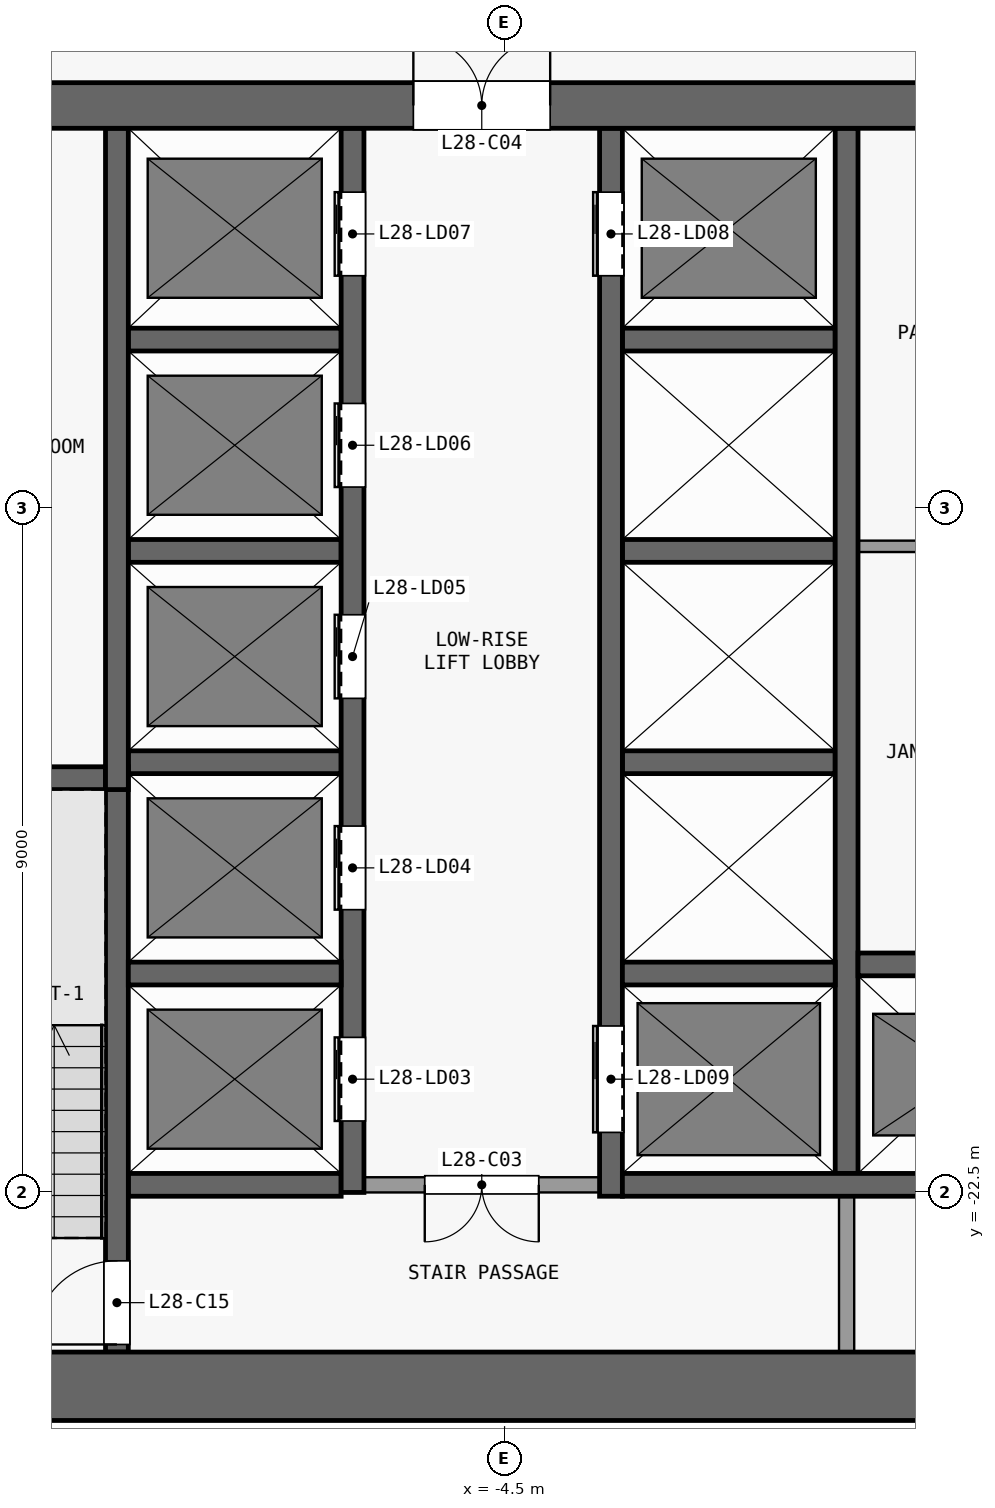
"""IFC4 building model, lengths in metres.
Left out: names, types, materials, properties, quantities, classifications, styles, units other than length and angle.
Written with IfcOpenShell. Run it as: python <this file> out.ifc"""

import sys

from ifc_helpers import new_model, si_unit, direction, frame, frame_2d, origin, place, context, subcontext, project, spatial, rectangle, extrude, element, fill, save


model = new_model("IFC4")
c1 = context("Model", 3, precision=1e-05, world=origin(), true_north=direction((0.0, 1.0)))
c2 = subcontext(c1, "Body", "Model", "MODEL_VIEW")
j1 = project(units=[si_unit("LENGTHUNIT", "METRE"), si_unit("PLANEANGLEUNIT", "RADIAN")], contexts=[c1])
p1 = place(None, origin())
s1 = spatial("IfcSite", under=j1, at=p1, CompositionType="ELEMENT")
p2 = place(p1, origin())
s2 = spatial("IfcBuilding", under=s1, at=p2, CompositionType="ELEMENT")
p3 = place(p2, frame((0.0, 0.0, 113.5)))
s3 = spatial("IfcBuildingStorey", under=s2, at=p3, CompositionType="ELEMENT", Elevation=113.5)
p4 = place(p3, frame((-13.4, -25.05, 0.0), z_axis=(0.0, 0.0, 1.0), x_axis=(1.0, 0.0, 0.0)))
e1 = element("IfcWall", 1, at=p4, inside=s3, PredefinedType="SHEAR", context=c2, shape_type="SweptSolid", body=[
    extrude(rectangle(XDim=26.8, YDim=0.9, at=frame_2d((13.4, 0.0))), origin(), (0.0, 0.0, 1.0), 3.3),
])
p5 = place(p3, frame((-13.4, -8.2, 0.0), z_axis=(0.0, 0.0, 1.0), x_axis=(1.0, 0.0, 0.0)))
e2 = element("IfcWall", 2, at=p5, inside=s3, PredefinedType="SHEAR", context=c2, shape_type="SweptSolid", body=[
    extrude(rectangle(XDim=26.8, YDim=0.6, at=frame_2d((13.4, 0.0))), origin(), (0.0, 0.0, 1.0), 3.3),
])
p6 = place(p5, frame((7.7, 0.0, 0.0)))
e3 = element("IfcOpeningElement", 3, at=p6, cuts=e2, PredefinedType="OPENING", context=c2, shape_type="SweptSolid", body=[
    extrude(rectangle(XDim=1.8, YDim=2.1, at=frame_2d((0.9, 1.05))), frame((0.0, 0.31, 0.0), z_axis=(0.0, -1.0, 0.0), x_axis=(1.0, 0.0, 0.0)), (0.0, 0.0, 1.0), 0.62),
])
p7 = place(p5, frame((17.3, 0.0, 0.0)))
e4 = element("IfcOpeningElement", 4, at=p7, cuts=e2, PredefinedType="OPENING", context=c2, shape_type="SweptSolid", body=[
    extrude(rectangle(XDim=1.8, YDim=2.1, at=frame_2d((0.9, 1.05))), frame((0.0, 0.31, 0.0), z_axis=(0.0, -1.0, 0.0), x_axis=(1.0, 0.0, 0.0)), (0.0, 0.0, 1.0), 0.62),
])
p8 = place(p5, frame((1.625, 0.0, 0.0)))
e5 = element("IfcOpeningElement", 5, at=p8, cuts=e2, PredefinedType="OPENING", context=c2, shape_type="SweptSolid", body=[
    extrude(rectangle(XDim=1.2, YDim=2.1, at=frame_2d((0.6, 1.05))), frame((0.0, 0.31, 0.0), z_axis=(0.0, -1.0, 0.0), x_axis=(1.0, 0.0, 0.0)), (0.0, 0.0, 1.0), 0.62),
])
p9 = place(p5, frame((23.275, 0.0, 0.0)))
e6 = element("IfcOpeningElement", 6, at=p9, cuts=e2, PredefinedType="OPENING", context=c2, shape_type="SweptSolid", body=[
    extrude(rectangle(XDim=0.9, YDim=2.1, at=frame_2d((0.45, 1.05))), frame((0.0, 0.31, 0.0), z_axis=(0.0, -1.0, 0.0), x_axis=(1.0, 0.0, 0.0)), (0.0, 0.0, 1.0), 0.62),
])
p10 = place(p3, frame((-9.45, -22.4, 0.0), z_axis=(0.0, 0.0, 1.0), x_axis=(1.0, 0.0, 0.0)))
e7 = element("IfcWall", 7, at=p10, inside=s3, PredefinedType="SHEAR", context=c2, shape_type="SweptSolid", body=[
    extrude(rectangle(XDim=2.8, YDim=0.3, at=frame_2d((1.4, 0.0))), origin(), (0.0, 0.0, 1.0), 3.3),
])
p11 = place(p3, frame((-3.25, -22.4, 0.0), z_axis=(0.0, 0.0, 1.0), x_axis=(-1.0, 0.0, 0.0)))
e8 = element("IfcWall", 8, at=p11, inside=s3, PredefinedType="PARTITIONING", context=c2, shape_type="SweptSolid", body=[
    extrude(rectangle(XDim=3.1, YDim=0.2, at=frame_2d((1.55, 0.0))), origin(), (0.0, 0.0, 1.0), 3.3),
])
p12 = place(p11, frame((0.8, 0.0, 0.0)))
e9 = element("IfcOpeningElement", 9, at=p12, cuts=e8, PredefinedType="OPENING", context=c2, shape_type="SweptSolid", body=[
    extrude(rectangle(XDim=1.5, YDim=2.1, at=frame_2d((0.75, 1.05))), frame((0.0, 0.11, 0.0), z_axis=(0.0, -1.0, 0.0), x_axis=(1.0, 0.0, 0.0)), (0.0, 0.0, 1.0), 0.22),
])
p13 = place(p3, frame((-2.95, -22.4, 0.0), z_axis=(0.0, 0.0, 1.0), x_axis=(1.0, 0.0, 0.0)))
e10 = element("IfcWall", 10, at=p13, inside=s3, PredefinedType="SHEAR", context=c2, shape_type="SweptSolid", body=[
    extrude(rectangle(XDim=6.2, YDim=0.3, at=frame_2d((3.1, 0.0))), origin(), (0.0, 0.0, 1.0), 3.3),
])
for number, where, z_axis, x_axis in (
    (11, (-9.45, -19.62, 0.0), (0.0, 0.0, 1.0), (1.0, 0.0, 0.0)),
    (12, (-2.95, -19.62, 0.0), (0.0, 0.0, 1.0), (1.0, 0.0, 0.0)),
):
    element("IfcWall", number, at=place(p3, frame(where, z_axis=z_axis, x_axis=x_axis)), inside=s3, PredefinedType="SHEAR", context=c2, shape_type="SweptSolid", body=[
        extrude(rectangle(XDim=2.8, YDim=0.3, at=frame_2d((1.4, 0.0))), origin(), (0.0, 0.0, 1.0), 3.3),
    ])
p14 = place(p3, frame((0.15, -19.5, 0.0), z_axis=(0.0, 0.0, 1.0), x_axis=(1.0, 0.0, 0.0)))
e13 = element("IfcWall", 13, at=p14, inside=s3, PredefinedType="SHEAR", context=c2, shape_type="SweptSolid", body=[
    extrude(rectangle(XDim=3.025, YDim=0.3, at=frame_2d((1.513, 0.0))), origin(), (0.0, 0.0, 1.0), 3.3),
])
p15 = place(p3, frame((-12.6, -17.05, 0.0), z_axis=(0.0, 0.0, 1.0), x_axis=(1.0, 0.0, 0.0)))
e14 = element("IfcWall", 14, at=p15, inside=s3, PredefinedType="SHEAR", context=c2, shape_type="SweptSolid", body=[
    extrude(rectangle(XDim=2.85, YDim=0.3, at=frame_2d((1.425, 0.0))), origin(), (0.0, 0.0, 1.0), 3.3),
])
for number, where, z_axis, x_axis in (
    (15, (-9.45, -16.84, 0.0), (0.0, 0.0, 1.0), (1.0, 0.0, 0.0)),
    (16, (-2.95, -16.84, 0.0), (0.0, 0.0, 1.0), (1.0, 0.0, 0.0)),
    (17, (-9.45, -14.06, 0.0), (0.0, 0.0, 1.0), (1.0, 0.0, 0.0)),
    (18, (-2.95, -14.06, 0.0), (0.0, 0.0, 1.0), (1.0, 0.0, 0.0)),
):
    element("IfcWall", number, at=place(p3, frame(where, z_axis=z_axis, x_axis=x_axis)), inside=s3, PredefinedType="SHEAR", context=c2, shape_type="SweptSolid", body=[
        extrude(rectangle(XDim=2.8, YDim=0.3, at=frame_2d((1.4, 0.0))), origin(), (0.0, 0.0, 1.0), 3.3),
    ])
p16 = place(p3, frame((0.15, -14.0, 0.0), z_axis=(0.0, 0.0, 1.0), x_axis=(1.0, 0.0, 0.0)))
e19 = element("IfcWall", 19, at=p16, inside=s3, PredefinedType="PARTITIONING", context=c2, shape_type="SweptSolid", body=[
    extrude(rectangle(XDim=2.875, YDim=0.15, at=frame_2d((1.438, 0.0))), origin(), (0.0, 0.0, 1.0), 3.3),
])
for number, where, z_axis, x_axis in (
    (20, (-9.45, -11.28, 0.0), (0.0, 0.0, 1.0), (1.0, 0.0, 0.0)),
    (21, (-2.95, -11.28, 0.0), (0.0, 0.0, 1.0), (1.0, 0.0, 0.0)),
):
    element("IfcWall", number, at=place(p3, frame(where, z_axis=z_axis, x_axis=x_axis)), inside=s3, PredefinedType="SHEAR", context=c2, shape_type="SweptSolid", body=[
        extrude(rectangle(XDim=2.8, YDim=0.3, at=frame_2d((1.4, 0.0))), origin(), (0.0, 0.0, 1.0), 3.3),
    ])
p17 = place(p3, frame((-9.6, -24.6, 0.0), z_axis=(0.0, 0.0, 1.0), x_axis=(0.0, 1.0, 0.0)))
e22 = element("IfcWall", 22, at=p17, inside=s3, PredefinedType="SHEAR", context=c2, shape_type="SweptSolid", body=[
    extrude(rectangle(XDim=7.7, YDim=0.3, at=frame_2d((3.85, 0.0))), origin(), (0.0, 0.0, 1.0), 3.3),
])
p18 = place(p17, frame((0.1, 0.0, 0.0)))
e23 = element("IfcOpeningElement", 23, at=p18, cuts=e22, PredefinedType="OPENING", context=c2, shape_type="SweptSolid", body=[
    extrude(rectangle(XDim=1.1, YDim=2.1, at=frame_2d((0.55, 1.05))), frame((0.0, 0.16, 0.0), z_axis=(0.0, -1.0, 0.0), x_axis=(1.0, 0.0, 0.0)), (0.0, 0.0, 1.0), 0.32),
])
p19 = place(p3, frame((-9.6, -17.2, 0.0), z_axis=(0.0, 0.0, 1.0), x_axis=(0.0, 1.0, 0.0)))
e24 = element("IfcWall", 24, at=p19, inside=s3, PredefinedType="SHEAR", context=c2, shape_type="SweptSolid", body=[
    extrude(rectangle(XDim=8.7, YDim=0.3, at=frame_2d((4.35, 0.0))), origin(), (0.0, 0.0, 1.0), 3.3),
])
p20 = place(p3, frame((-6.5, -22.5, 0.0), z_axis=(0.0, 0.0, 1.0), x_axis=(0.0, 1.0, 0.0)))
e25 = element("IfcWall", 25, at=p20, inside=s3, PredefinedType="SHEAR", context=c2, shape_type="SweptSolid", body=[
    extrude(rectangle(XDim=14.0, YDim=0.3, at=frame_2d((7.0, 0.0))), origin(), (0.0, 0.0, 1.0), 3.3),
])
p21 = place(p20, frame((0.94, 0.0, 0.0)))
e26 = element("IfcOpeningElement", 26, at=p21, cuts=e25, PredefinedType="OPENING", context=c2, shape_type="SweptSolid", body=[
    extrude(rectangle(XDim=1.1, YDim=2.1, at=frame_2d((0.55, 1.05))), frame((0.0, 0.16, 0.0), z_axis=(0.0, -1.0, 0.0), x_axis=(1.0, 0.0, 0.0)), (0.0, 0.0, 1.0), 0.32),
])
p22 = place(p20, frame((3.72, 0.0, 0.0)))
e27 = element("IfcOpeningElement", 27, at=p22, cuts=e25, PredefinedType="OPENING", context=c2, shape_type="SweptSolid", body=[
    extrude(rectangle(XDim=1.1, YDim=2.1, at=frame_2d((0.55, 1.05))), frame((0.0, 0.16, 0.0), z_axis=(0.0, -1.0, 0.0), x_axis=(1.0, 0.0, 0.0)), (0.0, 0.0, 1.0), 0.32),
])
p23 = place(p20, frame((6.5, 0.0, 0.0)))
e28 = element("IfcOpeningElement", 28, at=p23, cuts=e25, PredefinedType="OPENING", context=c2, shape_type="SweptSolid", body=[
    extrude(rectangle(XDim=1.1, YDim=2.1, at=frame_2d((0.55, 1.05))), frame((0.0, 0.16, 0.0), z_axis=(0.0, -1.0, 0.0), x_axis=(1.0, 0.0, 0.0)), (0.0, 0.0, 1.0), 0.32),
])
p24 = place(p20, frame((9.28, 0.0, 0.0)))
e29 = element("IfcOpeningElement", 29, at=p24, cuts=e25, PredefinedType="OPENING", context=c2, shape_type="SweptSolid", body=[
    extrude(rectangle(XDim=1.1, YDim=2.1, at=frame_2d((0.55, 1.05))), frame((0.0, 0.16, 0.0), z_axis=(0.0, -1.0, 0.0), x_axis=(1.0, 0.0, 0.0)), (0.0, 0.0, 1.0), 0.32),
])
p25 = place(p20, frame((12.06, 0.0, 0.0)))
e30 = element("IfcOpeningElement", 30, at=p25, cuts=e25, PredefinedType="OPENING", context=c2, shape_type="SweptSolid", body=[
    extrude(rectangle(XDim=1.1, YDim=2.1, at=frame_2d((0.55, 1.05))), frame((0.0, 0.16, 0.0), z_axis=(0.0, -1.0, 0.0), x_axis=(1.0, 0.0, 0.0)), (0.0, 0.0, 1.0), 0.32),
])
p26 = place(p3, frame((-3.1, -22.55, 0.0), z_axis=(0.0, 0.0, 1.0), x_axis=(0.0, 1.0, 0.0)))
e31 = element("IfcWall", 31, at=p26, inside=s3, PredefinedType="SHEAR", context=c2, shape_type="SweptSolid", body=[
    extrude(rectangle(XDim=14.05, YDim=0.3, at=frame_2d((7.025, 0.0))), origin(), (0.0, 0.0, 1.0), 3.3),
])
p27 = place(p26, frame((12.11, 0.0, 0.0)))
e32 = element("IfcOpeningElement", 32, at=p27, cuts=e31, PredefinedType="OPENING", context=c2, shape_type="SweptSolid", body=[
    extrude(rectangle(XDim=1.1, YDim=2.1, at=frame_2d((0.55, 1.05))), frame((0.0, 0.16, 0.0), z_axis=(0.0, -1.0, 0.0), x_axis=(1.0, 0.0, 0.0)), (0.0, 0.0, 1.0), 0.32),
])
p28 = place(p26, frame((0.84, 0.0, 0.0)))
e33 = element("IfcOpeningElement", 33, at=p28, cuts=e31, PredefinedType="OPENING", context=c2, shape_type="SweptSolid", body=[
    extrude(rectangle(XDim=1.4, YDim=2.1, at=frame_2d((0.7, 1.05))), frame((0.0, 0.16, 0.0), z_axis=(0.0, -1.0, 0.0), x_axis=(1.0, 0.0, 0.0)), (0.0, 0.0, 1.0), 0.32),
])
p29 = place(p3, frame((0.0, -24.6, 0.0), z_axis=(0.0, 0.0, 1.0), x_axis=(0.0, 1.0, 0.0)))
e34 = element("IfcWall", 34, at=p29, inside=s3, PredefinedType="PARTITIONING", context=c2, shape_type="SweptSolid", body=[
    extrude(rectangle(XDim=2.05, YDim=0.2, at=frame_2d((1.025, 0.0))), origin(), (0.0, 0.0, 1.0), 3.3),
])
p30 = place(p3, frame((0.0, -22.25, 0.0), z_axis=(0.0, 0.0, 1.0), x_axis=(0.0, 1.0, 0.0)))
e35 = element("IfcWall", 35, at=p30, inside=s3, PredefinedType="SHEAR", context=c2, shape_type="SweptSolid", body=[
    extrude(rectangle(XDim=13.75, YDim=0.3, at=frame_2d((6.875, 0.0))), origin(), (0.0, 0.0, 1.0), 3.3),
])
p31 = place(p21, origin())
e36 = element("IfcDoor", 36, at=p31, inside=s3, OperationType="DOUBLE_DOOR_SLIDING", PredefinedType="DOOR", context=c2, shape_type="SweptSolid", body=[
    extrude(rectangle(XDim=1.1, YDim=2.1, at=frame_2d((0.55, 1.05))), frame((0.0, 0.025, 0.0), z_axis=(0.0, -1.0, 0.0), x_axis=(1.0, 0.0, 0.0)), (0.0, 0.0, 1.0), 0.05),
])
fill(e26, e36)
p32 = place(p22, origin())
e37 = element("IfcDoor", 37, at=p32, inside=s3, OperationType="DOUBLE_DOOR_SLIDING", PredefinedType="DOOR", context=c2, shape_type="SweptSolid", body=[
    extrude(rectangle(XDim=1.1, YDim=2.1, at=frame_2d((0.55, 1.05))), frame((0.0, 0.025, 0.0), z_axis=(0.0, -1.0, 0.0), x_axis=(1.0, 0.0, 0.0)), (0.0, 0.0, 1.0), 0.05),
])
fill(e27, e37)
p33 = place(p23, origin())
e38 = element("IfcDoor", 38, at=p33, inside=s3, OperationType="DOUBLE_DOOR_SLIDING", PredefinedType="DOOR", context=c2, shape_type="SweptSolid", body=[
    extrude(rectangle(XDim=1.1, YDim=2.1, at=frame_2d((0.55, 1.05))), frame((0.0, 0.025, 0.0), z_axis=(0.0, -1.0, 0.0), x_axis=(1.0, 0.0, 0.0)), (0.0, 0.0, 1.0), 0.05),
])
fill(e28, e38)
p34 = place(p24, origin())
e39 = element("IfcDoor", 39, at=p34, inside=s3, OperationType="DOUBLE_DOOR_SLIDING", PredefinedType="DOOR", context=c2, shape_type="SweptSolid", body=[
    extrude(rectangle(XDim=1.1, YDim=2.1, at=frame_2d((0.55, 1.05))), frame((0.0, 0.025, 0.0), z_axis=(0.0, -1.0, 0.0), x_axis=(1.0, 0.0, 0.0)), (0.0, 0.0, 1.0), 0.05),
])
fill(e29, e39)
p35 = place(p25, origin())
e40 = element("IfcDoor", 40, at=p35, inside=s3, OperationType="DOUBLE_DOOR_SLIDING", PredefinedType="DOOR", context=c2, shape_type="SweptSolid", body=[
    extrude(rectangle(XDim=1.1, YDim=2.1, at=frame_2d((0.55, 1.05))), frame((0.0, 0.025, 0.0), z_axis=(0.0, -1.0, 0.0), x_axis=(1.0, 0.0, 0.0)), (0.0, 0.0, 1.0), 0.05),
])
fill(e30, e40)
p36 = place(p27, origin())
e41 = element("IfcDoor", 41, at=p36, inside=s3, OperationType="DOUBLE_DOOR_SLIDING", PredefinedType="DOOR", context=c2, shape_type="SweptSolid", body=[
    extrude(rectangle(XDim=1.1, YDim=2.1, at=frame_2d((0.55, 1.05))), frame((0.0, 0.025, 0.0), z_axis=(0.0, -1.0, 0.0), x_axis=(1.0, 0.0, 0.0)), (0.0, 0.0, 1.0), 0.05),
])
fill(e32, e41)
p37 = place(p28, origin())
e42 = element("IfcDoor", 42, at=p37, inside=s3, OperationType="DOUBLE_DOOR_SLIDING", PredefinedType="DOOR", context=c2, shape_type="SweptSolid", body=[
    extrude(rectangle(XDim=1.4, YDim=2.1, at=frame_2d((0.7, 1.05))), frame((0.0, 0.025, 0.0), z_axis=(0.0, -1.0, 0.0), x_axis=(1.0, 0.0, 0.0)), (0.0, 0.0, 1.0), 0.05),
])
fill(e33, e42)
p38 = place(p12, origin())
e43 = element("IfcDoor", 43, at=p38, inside=s3, OperationType="DOUBLE_DOOR_SINGLE_SWING", PredefinedType="DOOR", context=c2, shape_type="SweptSolid", body=[
    extrude(rectangle(XDim=1.5, YDim=2.1, at=frame_2d((0.75, 1.05))), frame((0.0, 0.025, 0.0), z_axis=(0.0, -1.0, 0.0), x_axis=(1.0, 0.0, 0.0)), (0.0, 0.0, 1.0), 0.05),
])
fill(e9, e43)
p39 = place(p6, origin())
e44 = element("IfcDoor", 44, at=p39, inside=s3, OperationType="DOUBLE_DOOR_SINGLE_SWING", PredefinedType="DOOR", context=c2, shape_type="SweptSolid", body=[
    extrude(rectangle(XDim=1.8, YDim=2.1, at=frame_2d((0.9, 1.05))), frame((0.0, 0.025, 0.0), z_axis=(0.0, -1.0, 0.0), x_axis=(1.0, 0.0, 0.0)), (0.0, 0.0, 1.0), 0.05),
])
fill(e3, e44)
p40 = place(p18, origin())
e45 = element("IfcDoor", 45, at=p40, inside=s3, OperationType="SINGLE_SWING_LEFT", PredefinedType="DOOR", context=c2, shape_type="SweptSolid", body=[
    extrude(rectangle(XDim=1.1, YDim=2.1, at=frame_2d((0.55, 1.05))), frame((0.0, 0.025, 0.0), z_axis=(0.0, -1.0, 0.0), x_axis=(1.0, 0.0, 0.0)), (0.0, 0.0, 1.0), 0.05),
])
fill(e23, e45)
save(model, sys.argv[1])
